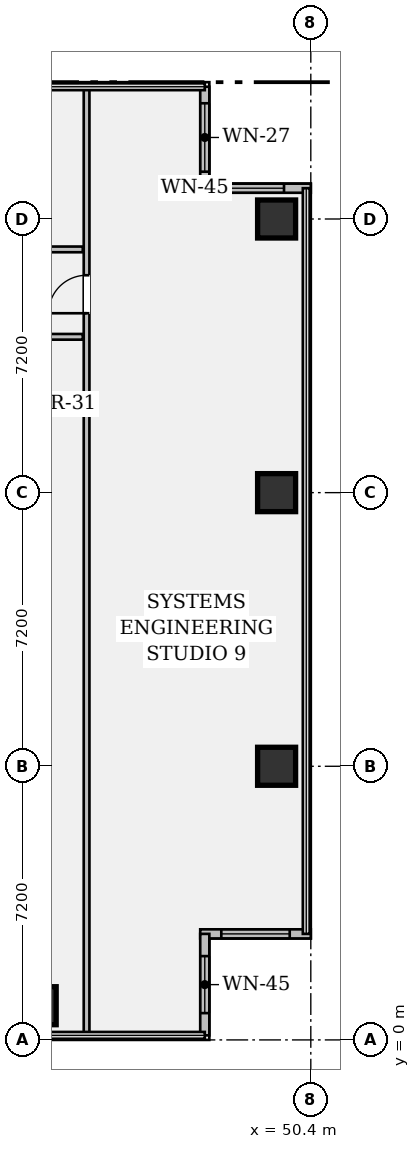
"""IFC4 building model, lengths in metres.
Left out: names, types, materials, properties, quantities, classifications, styles, units other than length and angle.
Written with IfcOpenShell. Run it as: python <this file> out.ifc"""

import sys

from ifc_helpers import new_model, si_unit, direction, frame, frame_2d, origin, origin_2d, place, context, subcontext, project, spatial, rectangle, hollow_rectangle, extrude, element, fill, save


model = new_model("IFC4")
c1 = context("Model", 3, precision=1e-05, world=origin(), true_north=direction((0.0, 1.0)))
c2 = subcontext(c1, "Body", "Model", "MODEL_VIEW")
j1 = project(units=[si_unit("LENGTHUNIT", "METRE"), si_unit("PLANEANGLEUNIT", "RADIAN")], contexts=[c1])
p1 = place(None, origin())
s1 = spatial("IfcSite", under=j1, at=p1, CompositionType="ELEMENT")
p2 = place(p1, origin())
s2 = spatial("IfcBuilding", under=s1, at=p2, CompositionType="ELEMENT")
p3 = place(p2, frame((0.0, 0.0, 50.4)))
s3 = spatial("IfcBuildingStorey", under=s2, at=p3, CompositionType="ELEMENT", Elevation=50.4)
for number, where, z_axis, x_axis in (
    (1, (43.2, 0.9, 0.0), (0.0, 0.0, 1.0), (1.0, 0.0, 0.0)),
    (2, (49.5, 7.2, 0.0), (0.0, 0.0, 1.0), (1.0, 0.0, 0.0)),
    (3, (49.5, 14.4, 0.0), (0.0, 0.0, 1.0), (1.0, 0.0, 0.0)),
    (4, (49.5, 21.6, 0.0), (0.0, 0.0, 1.0), (1.0, 0.0, 0.0)),
):
    element("IfcColumn", number, at=place(p3, frame(where, z_axis=z_axis, x_axis=x_axis)), inside=s3, PredefinedType="COLUMN", context=c2, shape_type="SweptSolid", body=[
        extrude(hollow_rectangle(XDim=1.0, YDim=1.0, WallThickness=0.065, at=origin_2d()), origin(), (0.0, 0.0, 1.0), 3.57),
    ])
p4 = place(p3, frame((47.61, 25.08, 0.0), z_axis=(0.0, 0.0, 1.0), x_axis=(0.0, -1.0, 0.0)))
e5 = element("IfcWall", 5, at=p4, inside=s3, PredefinedType="STANDARD", context=c2, shape_type="SweptSolid", body=[
    extrude(rectangle(XDim=2.67, YDim=0.24, at=frame_2d((1.335, 0.0))), origin(), (0.0, 0.0, 1.0), 3.57),
])
p5 = place(p4, frame((0.435, 0.0, 0.95)))
e6 = element("IfcOpeningElement", 6, at=p5, cuts=e5, PredefinedType="OPENING", context=c2, shape_type="SweptSolid", body=[
    extrude(rectangle(XDim=1.8, YDim=1.35, at=frame_2d((0.9, 0.675))), frame((0.0, 0.132, 0.0), z_axis=(0.0, -1.0, 0.0), x_axis=(1.0, 0.0, 0.0)), (0.0, 0.0, 1.0), 0.264),
])
p6 = place(p3, frame((47.49, 22.41, 0.0), z_axis=(0.0, 0.0, 1.0), x_axis=(1.0, 0.0, 0.0)))
e7 = element("IfcWall", 7, at=p6, inside=s3, PredefinedType="STANDARD", context=c2, shape_type="SweptSolid", body=[
    extrude(rectangle(XDim=2.91, YDim=0.24, at=frame_2d((1.455, 0.0))), origin(), (0.0, 0.0, 1.0), 3.57),
])
p7 = place(p6, frame((0.705, 0.0, 0.95)))
e8 = element("IfcOpeningElement", 8, at=p7, cuts=e7, PredefinedType="OPENING", context=c2, shape_type="SweptSolid", body=[
    extrude(rectangle(XDim=1.5, YDim=1.8, at=frame_2d((0.75, 0.9))), frame((0.0, 0.132, 0.0), z_axis=(0.0, -1.0, 0.0), x_axis=(1.0, 0.0, 0.0)), (0.0, 0.0, 1.0), 0.264),
])
p8 = place(p3, frame((50.4, 2.79, 0.0), z_axis=(0.0, 0.0, 1.0), x_axis=(-1.0, 0.0, 0.0)))
e9 = element("IfcWall", 9, at=p8, inside=s3, PredefinedType="STANDARD", context=c2, shape_type="SweptSolid", body=[
    extrude(rectangle(XDim=2.91, YDim=0.24, at=frame_2d((1.455, 0.0))), origin(), (0.0, 0.0, 1.0), 3.57),
])
p9 = place(p8, frame((0.555, 0.0, 0.95)))
e10 = element("IfcOpeningElement", 10, at=p9, cuts=e9, PredefinedType="OPENING", context=c2, shape_type="SweptSolid", body=[
    extrude(rectangle(XDim=1.8, YDim=1.35, at=frame_2d((0.9, 0.675))), frame((0.0, 0.132, 0.0), z_axis=(0.0, -1.0, 0.0), x_axis=(1.0, 0.0, 0.0)), (0.0, 0.0, 1.0), 0.264),
])
p10 = place(p3, frame((47.61, 2.79, 0.0), z_axis=(0.0, 0.0, 1.0), x_axis=(0.0, -1.0, 0.0)))
e11 = element("IfcWall", 11, at=p10, inside=s3, PredefinedType="STANDARD", context=c2, shape_type="SweptSolid", body=[
    extrude(rectangle(XDim=2.67, YDim=0.24, at=frame_2d((1.335, 0.0))), origin(), (0.0, 0.0, 1.0), 3.57),
])
p11 = place(p10, frame((0.585, 0.0, 0.95)))
e12 = element("IfcOpeningElement", 12, at=p11, cuts=e11, PredefinedType="OPENING", context=c2, shape_type="SweptSolid", body=[
    extrude(rectangle(XDim=1.5, YDim=1.8, at=frame_2d((0.75, 0.9))), frame((0.0, 0.132, 0.0), z_axis=(0.0, -1.0, 0.0), x_axis=(1.0, 0.0, 0.0)), (0.0, 0.0, 1.0), 0.264),
])
p12 = place(p3, frame((17.35, 18.5, 0.0), z_axis=(0.0, 0.0, 1.0), x_axis=(1.0, 0.0, 0.0)))
e13 = element("IfcWall", 13, at=p12, inside=s3, PredefinedType="PARTITIONING", context=c2, shape_type="SweptSolid", body=[
    extrude(rectangle(XDim=27.05, YDim=0.15, at=frame_2d((13.525, 0.0))), origin(), (0.0, 0.0, 1.0), 2.699),
])
p13 = place(p12, frame((2.52, 0.0, 0.0)))
e14 = element("IfcOpeningElement", 14, at=p13, cuts=e13, PredefinedType="OPENING", context=c2, shape_type="SweptSolid", body=[
    extrude(rectangle(XDim=0.95, YDim=2.15, at=frame_2d((0.475, 1.075))), frame((0.0, 0.087, 0.0), z_axis=(0.0, -1.0, 0.0), x_axis=(1.0, 0.0, 0.0)), (0.0, 0.0, 1.0), 0.174),
])
p14 = place(p12, frame((9.15, 0.0, 0.0)))
e15 = element("IfcOpeningElement", 15, at=p14, cuts=e13, PredefinedType="OPENING", context=c2, shape_type="SweptSolid", body=[
    extrude(rectangle(XDim=0.95, YDim=2.15, at=frame_2d((0.475, 1.075))), frame((0.0, 0.087, 0.0), z_axis=(0.0, -1.0, 0.0), x_axis=(1.0, 0.0, 0.0)), (0.0, 0.0, 1.0), 0.174),
])
p15 = place(p12, frame((16.35, 0.0, 0.0)))
e16 = element("IfcOpeningElement", 16, at=p15, cuts=e13, PredefinedType="OPENING", context=c2, shape_type="SweptSolid", body=[
    extrude(rectangle(XDim=0.95, YDim=2.15, at=frame_2d((0.475, 1.075))), frame((0.0, 0.087, 0.0), z_axis=(0.0, -1.0, 0.0), x_axis=(1.0, 0.0, 0.0)), (0.0, 0.0, 1.0), 0.174),
])
p16 = place(p12, frame((23.25, 0.0, 0.0)))
e17 = element("IfcOpeningElement", 17, at=p16, cuts=e13, PredefinedType="OPENING", context=c2, shape_type="SweptSolid", body=[
    extrude(rectangle(XDim=0.95, YDim=2.15, at=frame_2d((0.475, 1.075))), frame((0.0, 0.087, 0.0), z_axis=(0.0, -1.0, 0.0), x_axis=(1.0, 0.0, 0.0)), (0.0, 0.0, 1.0), 0.174),
])
p17 = place(p3, frame((17.35, 20.8, 0.0), z_axis=(0.0, 0.0, 1.0), x_axis=(1.0, 0.0, 0.0)))
e18 = element("IfcWall", 18, at=p17, inside=s3, PredefinedType="PARTITIONING", context=c2, shape_type="SweptSolid", body=[
    extrude(rectangle(XDim=27.05, YDim=0.15, at=frame_2d((13.525, 0.0))), origin(), (0.0, 0.0, 1.0), 2.699),
])
p18 = place(p17, frame((6.32, 0.0, 0.0)))
e19 = element("IfcOpeningElement", 19, at=p18, cuts=e18, PredefinedType="OPENING", context=c2, shape_type="SweptSolid", body=[
    extrude(rectangle(XDim=0.95, YDim=2.15, at=frame_2d((0.475, 1.075))), frame((0.0, 0.087, 0.0), z_axis=(0.0, -1.0, 0.0), x_axis=(1.0, 0.0, 0.0)), (0.0, 0.0, 1.0), 0.174),
])
p19 = place(p17, frame((20.01, 0.0, 0.0)))
e20 = element("IfcOpeningElement", 20, at=p19, cuts=e18, PredefinedType="OPENING", context=c2, shape_type="SweptSolid", body=[
    extrude(rectangle(XDim=0.95, YDim=2.15, at=frame_2d((0.475, 1.075))), frame((0.0, 0.087, 0.0), z_axis=(0.0, -1.0, 0.0), x_axis=(1.0, 0.0, 0.0)), (0.0, 0.0, 1.0), 0.174),
])
p20 = place(p3, frame((44.5, 0.12, 0.0), z_axis=(0.0, 0.0, 1.0), x_axis=(0.0, 1.0, 0.0)))
e21 = element("IfcWall", 21, at=p20, inside=s3, PredefinedType="PARTITIONING", context=c2, shape_type="SweptSolid", body=[
    extrude(rectangle(XDim=24.96, YDim=0.15, at=frame_2d((12.48, 0.0))), origin(), (0.0, 0.0, 1.0), 2.699),
])
p21 = place(p20, frame((19.0, 0.0, 0.0)))
e22 = element("IfcOpeningElement", 22, at=p21, cuts=e21, PredefinedType="OPENING", context=c2, shape_type="SweptSolid", body=[
    extrude(rectangle(XDim=1.0, YDim=2.15, at=frame_2d((0.5, 1.075))), frame((0.0, 0.087, 0.0), z_axis=(0.0, -1.0, 0.0), x_axis=(1.0, 0.0, 0.0)), (0.0, 0.0, 1.0), 0.174),
])
p22 = place(p5, origin())
e23 = element("IfcWindow", 23, at=p22, inside=s3, PartitioningType="SINGLE_PANEL", PredefinedType="WINDOW", context=c2, shape_type="SweptSolid", body=[
    extrude(rectangle(XDim=1.8, YDim=1.35, at=frame_2d((0.9, 0.675))), frame((0.0, 0.03, 0.0), z_axis=(0.0, -1.0, 0.0), x_axis=(1.0, 0.0, 0.0)), (0.0, 0.0, 1.0), 0.06),
])
fill(e6, e23)
p23 = place(p7, origin())
e24 = element("IfcWindow", 24, at=p23, inside=s3, PartitioningType="SINGLE_PANEL", PredefinedType="WINDOW", context=c2, shape_type="SweptSolid", body=[
    extrude(rectangle(XDim=1.5, YDim=1.8, at=frame_2d((0.75, 0.9))), frame((0.0, 0.03, 0.0), z_axis=(0.0, -1.0, 0.0), x_axis=(1.0, 0.0, 0.0)), (0.0, 0.0, 1.0), 0.06),
])
fill(e8, e24)
p24 = place(p9, origin())
e25 = element("IfcWindow", 25, at=p24, inside=s3, PartitioningType="SINGLE_PANEL", PredefinedType="WINDOW", context=c2, shape_type="SweptSolid", body=[
    extrude(rectangle(XDim=1.8, YDim=1.35, at=frame_2d((0.9, 0.675))), frame((0.0, 0.03, 0.0), z_axis=(0.0, -1.0, 0.0), x_axis=(1.0, 0.0, 0.0)), (0.0, 0.0, 1.0), 0.06),
])
fill(e10, e25)
p25 = place(p11, origin())
e26 = element("IfcWindow", 26, at=p25, inside=s3, PartitioningType="SINGLE_PANEL", PredefinedType="WINDOW", context=c2, shape_type="SweptSolid", body=[
    extrude(rectangle(XDim=1.5, YDim=1.8, at=frame_2d((0.75, 0.9))), frame((0.0, 0.03, 0.0), z_axis=(0.0, -1.0, 0.0), x_axis=(1.0, 0.0, 0.0)), (0.0, 0.0, 1.0), 0.06),
])
fill(e12, e26)
p26 = place(p21, origin())
e27 = element("IfcDoor", 27, at=p26, inside=s3, OperationType="SINGLE_SWING_LEFT", PredefinedType="DOOR", context=c2, shape_type="SweptSolid", body=[
    extrude(rectangle(XDim=1.0, YDim=2.15, at=frame_2d((0.5, 1.075))), frame((0.0, 0.025, 0.0), z_axis=(0.0, -1.0, 0.0), x_axis=(1.0, 0.0, 0.0)), (0.0, 0.0, 1.0), 0.05),
])
fill(e22, e27)
save(model, sys.argv[1])
